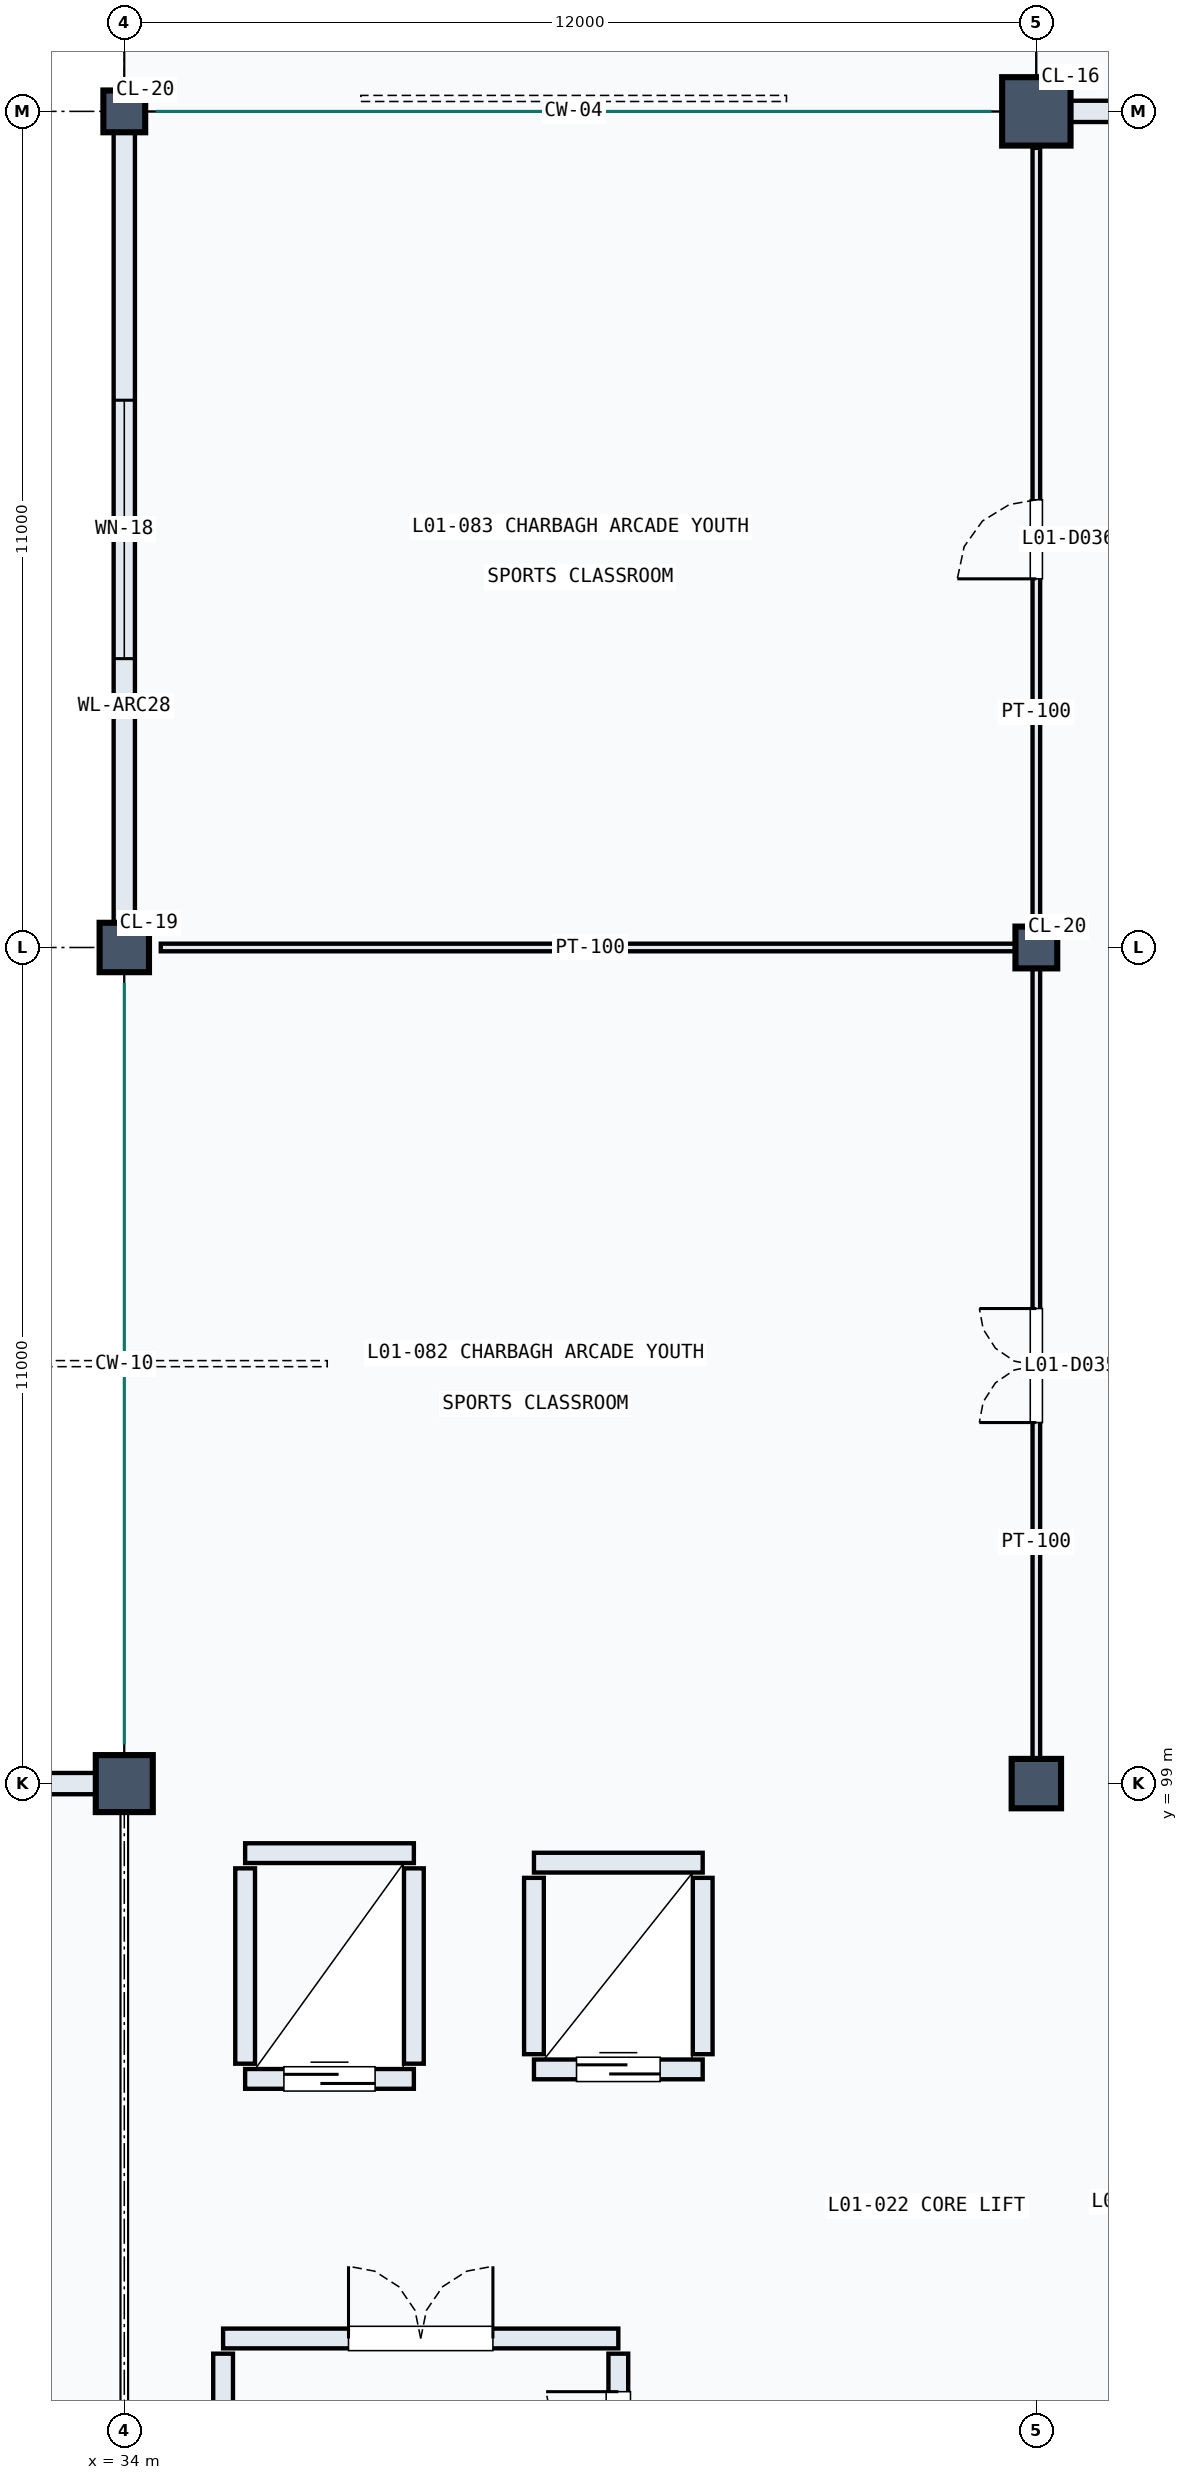
"""IFC4 building model, lengths in metres.
Left out: names, types, materials, properties, quantities, classifications, styles, units other than length and angle.
Written with IfcOpenShell. Run it as: python <this file> out.ifc"""

import sys

from ifc_helpers import new_model, si_unit, direction, frame, frame_2d, origin, origin_2d, place, context, subcontext, project, spatial, rectangle, circle, extrude, element, fill, save


model = new_model("IFC4")
c1 = context("Model", 3, precision=1e-05, world=origin(), true_north=direction((0.0, 1.0)))
c2 = subcontext(c1, "Body", "Model", "MODEL_VIEW")
j1 = project(units=[si_unit("LENGTHUNIT", "METRE"), si_unit("PLANEANGLEUNIT", "RADIAN")], contexts=[c1])
p1 = place(None, origin())
s1 = spatial("IfcSite", under=j1, at=p1, CompositionType="ELEMENT")
p2 = place(p1, origin())
s2 = spatial("IfcBuilding", under=s1, at=p2, CompositionType="ELEMENT")
p3 = place(p2, frame((0.0, 0.0, 5.4)))
s3 = spatial("IfcBuildingStorey", under=s2, at=p3, CompositionType="ELEMENT", Elevation=5.4)
p4 = place(p3, frame((34.0, 99.0, 0.0), z_axis=(0.0, 0.0, 1.0), x_axis=(1.0, 0.0, 0.0)))
e1 = element("IfcColumn", 1, at=p4, inside=s3, PredefinedType="COLUMN", context=c2, shape_type="SweptSolid", body=[
    extrude(circle(Radius=0.375, at=origin_2d()), origin(), (0.0, 0.0, 1.0), 4.8),
])
p5 = place(p3, frame((34.0, 110.0, 0.0), z_axis=(0.0, 0.0, 1.0), x_axis=(1.0, 0.0, 0.0)))
e2 = element("IfcColumn", 2, at=p5, inside=s3, PredefinedType="COLUMN", context=c2, shape_type="SweptSolid", body=[
    extrude(circle(Radius=0.325, at=origin_2d()), origin(), (0.0, 0.0, 1.0), 4.8),
])
p6 = place(p3, frame((34.0, 121.0, 0.0), z_axis=(0.0, 0.0, 1.0), x_axis=(1.0, 0.0, 0.0)))
e3 = element("IfcColumn", 3, at=p6, inside=s3, PredefinedType="COLUMN", context=c2, shape_type="SweptSolid", body=[
    extrude(circle(Radius=0.275, at=origin_2d()), origin(), (0.0, 0.0, 1.0), 4.8),
])
p7 = place(p3, frame((46.0, 99.0, 0.0), z_axis=(0.0, 0.0, 1.0), x_axis=(1.0, 0.0, 0.0)))
e4 = element("IfcColumn", 4, at=p7, inside=s3, PredefinedType="COLUMN", context=c2, shape_type="SweptSolid", body=[
    extrude(circle(Radius=0.325, at=origin_2d()), origin(), (0.0, 0.0, 1.0), 4.8),
])
p8 = place(p3, frame((46.0, 110.0, 0.0), z_axis=(0.0, 0.0, 1.0), x_axis=(1.0, 0.0, 0.0)))
e5 = element("IfcColumn", 5, at=p8, inside=s3, PredefinedType="COLUMN", context=c2, shape_type="SweptSolid", body=[
    extrude(circle(Radius=0.275, at=origin_2d()), origin(), (0.0, 0.0, 1.0), 4.8),
])
p9 = place(p3, frame((46.0, 121.0, 0.0), z_axis=(0.0, 0.0, 1.0), x_axis=(1.0, 0.0, 0.0)))
e6 = element("IfcColumn", 6, at=p9, inside=s3, PredefinedType="COLUMN", context=c2, shape_type="SweptSolid", body=[
    extrude(circle(Radius=0.45, at=origin_2d()), origin(), (0.0, 0.0, 1.0), 4.8),
])
p10 = place(p3, frame((22.22, 99.0, 0.0), z_axis=(0.0, 0.0, 1.0), x_axis=(1.0, 0.0, 0.0)))
e7 = element("IfcWall", 7, at=p10, inside=s3, PredefinedType="SOLIDWALL", context=c2, shape_type="SweptSolid", body=[
    extrude(rectangle(XDim=11.56, YDim=0.28, at=frame_2d((5.78, 0.0))), origin(), (0.0, 0.0, 1.0), 3.69),
])
p11 = place(p10, frame((4.48, 0.0, 1.1)))
e8 = element("IfcOpeningElement", 8, at=p11, cuts=e7, PredefinedType="OPENING", context=c2, shape_type="SweptSolid", body=[
    extrude(rectangle(XDim=2.6, YDim=1.4, at=frame_2d((1.3, 0.7))), frame((0.0, 0.15, 0.0), z_axis=(0.0, -1.0, 0.0), x_axis=(1.0, 0.0, 0.0)), (0.0, 0.0, 1.0), 0.3),
])
p12 = place(p3, frame((34.0, 110.22, 0.0), z_axis=(0.0, 0.0, 1.0), x_axis=(0.0, 1.0, 0.0)))
e9 = element("IfcWall", 9, at=p12, inside=s3, PredefinedType="SOLIDWALL", context=c2, shape_type="SweptSolid", body=[
    extrude(rectangle(XDim=10.56, YDim=0.28, at=frame_2d((5.28, 0.0))), origin(), (0.0, 0.0, 1.0), 4.465),
])
p13 = place(p12, frame((3.58, 0.0, 0.9)))
e10 = element("IfcOpeningElement", 10, at=p13, cuts=e9, PredefinedType="OPENING", context=c2, shape_type="SweptSolid", body=[
    extrude(rectangle(XDim=3.4, YDim=1.75, at=frame_2d((1.7, 0.875))), frame((0.0, 0.15, 0.0), z_axis=(0.0, -1.0, 0.0), x_axis=(1.0, 0.0, 0.0)), (0.0, 0.0, 1.0), 0.3),
])
p14 = place(p3, frame((46.22, 121.0, 0.0), z_axis=(0.0, 0.0, 1.0), x_axis=(1.0, 0.0, 0.0)))
e11 = element("IfcWall", 11, at=p14, inside=s3, PredefinedType="SOLIDWALL", context=c2, shape_type="SweptSolid", body=[
    extrude(rectangle(XDim=11.56, YDim=0.28, at=frame_2d((5.78, 0.0))), origin(), (0.0, 0.0, 1.0), 4.465),
])
p15 = place(p14, frame((4.53, 0.0, 1.0)))
e12 = element("IfcOpeningElement", 12, at=p15, cuts=e11, PredefinedType="OPENING", context=c2, shape_type="SweptSolid", body=[
    extrude(rectangle(XDim=2.5, YDim=1.35, at=frame_2d((1.25, 0.675))), frame((0.0, 0.15, 0.0), z_axis=(0.0, -1.0, 0.0), x_axis=(1.0, 0.0, 0.0)), (0.0, 0.0, 1.0), 0.3),
])
p16 = place(p3, frame((35.59, 95.115, 0.0), z_axis=(0.0, 0.0, 1.0), x_axis=(1.0, 0.0, 0.0)))
e13 = element("IfcWall", 13, at=p16, inside=s3, PredefinedType="SOLIDWALL", context=c2, shape_type="SweptSolid", body=[
    extrude(rectangle(XDim=2.22, YDim=0.26, at=frame_2d((1.11, 0.0))), origin(), (0.0, 0.0, 1.0), 4.46),
])
p17 = place(p16, frame((0.51, 0.0, 0.0)))
e14 = element("IfcOpeningElement", 14, at=p17, cuts=e13, PredefinedType="OPENING", context=c2, shape_type="SweptSolid", body=[
    extrude(rectangle(XDim=1.2, YDim=2.2, at=frame_2d((0.6, 1.1))), frame((0.0, 0.14, 0.0), z_axis=(0.0, -1.0, 0.0), x_axis=(1.0, 0.0, 0.0)), (0.0, 0.0, 1.0), 0.28),
])
p18 = place(p3, frame((35.59, 98.085, 0.0), z_axis=(0.0, 0.0, 1.0), x_axis=(1.0, 0.0, 0.0)))
e15 = element("IfcWall", 15, at=p18, inside=s3, PredefinedType="SOLIDWALL", context=c2, shape_type="SweptSolid", body=[
    extrude(rectangle(XDim=2.22, YDim=0.26, at=frame_2d((1.11, 0.0))), origin(), (0.0, 0.0, 1.0), 4.46),
])
for number, where, z_axis, x_axis in (
    (16, (35.59, 95.315, 0.0), (0.0, 0.0, 1.0), (0.0, 1.0, 0.0)),
    (17, (37.81, 95.315, 0.0), (0.0, 0.0, 1.0), (0.0, 1.0, 0.0)),
):
    element("IfcWall", number, at=place(p3, frame(where, z_axis=z_axis, x_axis=x_axis)), inside=s3, PredefinedType="SOLIDWALL", context=c2, shape_type="SweptSolid", body=[
        extrude(rectangle(XDim=2.57, YDim=0.26, at=frame_2d((1.285, 0.0))), origin(), (0.0, 0.0, 1.0), 4.46),
    ])
p19 = place(p3, frame((39.39, 95.24, 0.0), z_axis=(0.0, 0.0, 1.0), x_axis=(1.0, 0.0, 0.0)))
e18 = element("IfcWall", 18, at=p19, inside=s3, PredefinedType="SOLIDWALL", context=c2, shape_type="SweptSolid", body=[
    extrude(rectangle(XDim=2.22, YDim=0.26, at=frame_2d((1.11, 0.0))), origin(), (0.0, 0.0, 1.0), 4.46),
])
p20 = place(p19, frame((0.56, 0.0, 0.0)))
e19 = element("IfcOpeningElement", 19, at=p20, cuts=e18, PredefinedType="OPENING", context=c2, shape_type="SweptSolid", body=[
    extrude(rectangle(XDim=1.1, YDim=2.15, at=frame_2d((0.55, 1.075))), frame((0.0, 0.14, 0.0), z_axis=(0.0, -1.0, 0.0), x_axis=(1.0, 0.0, 0.0)), (0.0, 0.0, 1.0), 0.28),
])
p21 = place(p3, frame((39.39, 97.96, 0.0), z_axis=(0.0, 0.0, 1.0), x_axis=(1.0, 0.0, 0.0)))
e20 = element("IfcWall", 20, at=p21, inside=s3, PredefinedType="SOLIDWALL", context=c2, shape_type="SweptSolid", body=[
    extrude(rectangle(XDim=2.22, YDim=0.26, at=frame_2d((1.11, 0.0))), origin(), (0.0, 0.0, 1.0), 4.46),
])
for number, where, z_axis, x_axis in (
    (21, (39.39, 95.44, 0.0), (0.0, 0.0, 1.0), (0.0, 1.0, 0.0)),
    (22, (41.61, 95.44, 0.0), (0.0, 0.0, 1.0), (0.0, 1.0, 0.0)),
):
    element("IfcWall", number, at=place(p3, frame(where, z_axis=z_axis, x_axis=x_axis)), inside=s3, PredefinedType="SOLIDWALL", context=c2, shape_type="SweptSolid", body=[
        extrude(rectangle(XDim=2.32, YDim=0.26, at=frame_2d((1.16, 0.0))), origin(), (0.0, 0.0, 1.0), 4.46),
    ])
p22 = place(p3, frame((35.3, 91.7, 0.0), z_axis=(0.0, 0.0, 1.0), x_axis=(1.0, 0.0, 0.0)))
e23 = element("IfcWall", 23, at=p22, inside=s3, PredefinedType="SOLIDWALL", context=c2, shape_type="SweptSolid", body=[
    extrude(rectangle(XDim=5.2, YDim=0.26, at=frame_2d((2.6, 0.0))), origin(), (0.0, 0.0, 1.0), 4.46),
])
p23 = place(p22, frame((1.65, 0.0, 0.0)))
e24 = element("IfcOpeningElement", 24, at=p23, cuts=e23, PredefinedType="OPENING", context=c2, shape_type="SweptSolid", body=[
    extrude(rectangle(XDim=1.9, YDim=2.2, at=frame_2d((0.95, 1.1))), frame((0.0, 0.14, 0.0), z_axis=(0.0, -1.0, 0.0), x_axis=(1.0, 0.0, 0.0)), (0.0, 0.0, 1.0), 0.28),
])
p24 = place(p3, frame((35.3, 88.6, 0.0), z_axis=(0.0, 0.0, 1.0), x_axis=(0.0, 1.0, 0.0)))
e25 = element("IfcWall", 25, at=p24, inside=s3, PredefinedType="SOLIDWALL", context=c2, shape_type="SweptSolid", body=[
    extrude(rectangle(XDim=2.9, YDim=0.26, at=frame_2d((1.45, 0.0))), origin(), (0.0, 0.0, 1.0), 4.46),
])
p25 = place(p3, frame((40.5, 88.6, 0.0), z_axis=(0.0, 0.0, 1.0), x_axis=(0.0, 1.0, 0.0)))
e26 = element("IfcWall", 26, at=p25, inside=s3, PredefinedType="SOLIDWALL", context=c2, shape_type="SweptSolid", body=[
    extrude(rectangle(XDim=2.9, YDim=0.26, at=frame_2d((1.45, 0.0))), origin(), (0.0, 0.0, 1.0), 4.46),
])
p26 = place(p25, frame((0.5, 0.0, 0.0)))
e27 = element("IfcOpeningElement", 27, at=p26, cuts=e26, PredefinedType="OPENING", context=c2, shape_type="SweptSolid", body=[
    extrude(rectangle(XDim=1.9, YDim=2.2, at=frame_2d((0.95, 1.1))), frame((0.0, 0.14, 0.0), z_axis=(0.0, -1.0, 0.0), x_axis=(1.0, 0.0, 0.0)), (0.0, 0.0, 1.0), 0.28),
])
p27 = place(p3, frame((46.0, 99.22, 0.0), z_axis=(0.0, 0.0, 1.0), x_axis=(0.0, 1.0, 0.0)))
e28 = element("IfcWall", 28, at=p27, inside=s3, PredefinedType="PARTITIONING", context=c2, shape_type="SweptSolid", body=[
    extrude(rectangle(XDim=10.56, YDim=0.1, at=frame_2d((5.28, 0.0))), origin(), (0.0, 0.0, 1.0), 3.79),
])
p28 = place(p27, frame((4.53, 0.0, 0.0)))
e29 = element("IfcOpeningElement", 29, at=p28, cuts=e28, PredefinedType="OPENING", context=c2, shape_type="SweptSolid", body=[
    extrude(rectangle(XDim=1.5, YDim=2.3, at=frame_2d((0.75, 1.15))), frame((0.0, 0.06, 0.0), z_axis=(0.0, -1.0, 0.0), x_axis=(1.0, 0.0, 0.0)), (0.0, 0.0, 1.0), 0.12),
])
p29 = place(p3, frame((46.0, 110.22, 0.0), z_axis=(0.0, 0.0, 1.0), x_axis=(0.0, 1.0, 0.0)))
e30 = element("IfcWall", 30, at=p29, inside=s3, PredefinedType="PARTITIONING", context=c2, shape_type="SweptSolid", body=[
    extrude(rectangle(XDim=10.3, YDim=0.1, at=frame_2d((5.15, 0.0))), origin(), (0.0, 0.0, 1.0), 4.46),
])
p30 = place(p29, frame((4.63, 0.0, 0.0)))
e31 = element("IfcOpeningElement", 31, at=p30, cuts=e30, PredefinedType="OPENING", context=c2, shape_type="SweptSolid", body=[
    extrude(rectangle(XDim=1.04, YDim=2.15, at=frame_2d((0.52, 1.075))), frame((0.0, 0.06, 0.0), z_axis=(0.0, -1.0, 0.0), x_axis=(1.0, 0.0, 0.0)), (0.0, 0.0, 1.0), 0.12),
])
p31 = place(p3, frame((34.48, 110.0, 0.0), z_axis=(0.0, 0.0, 1.0), x_axis=(1.0, 0.0, 0.0)))
e32 = element("IfcWall", 32, at=p31, inside=s3, PredefinedType="PARTITIONING", context=c2, shape_type="SweptSolid", body=[
    extrude(rectangle(XDim=11.3, YDim=0.1, at=frame_2d((5.65, 0.0))), origin(), (0.0, 0.0, 1.0), 4.46),
])
p32 = place(p13, origin())
e33 = element("IfcWindow", 33, at=p32, inside=s3, PartitioningType="SINGLE_PANEL", PredefinedType="WINDOW", context=c2, shape_type="SweptSolid", body=[
    extrude(rectangle(XDim=3.4, YDim=1.75, at=frame_2d((1.7, 0.875))), frame((0.0, 0.03, 0.0), z_axis=(0.0, -1.0, 0.0), x_axis=(1.0, 0.0, 0.0)), (0.0, 0.0, 1.0), 0.06),
])
fill(e10, e33)
p33 = place(p17, origin())
e34 = element("IfcDoor", 34, at=p33, inside=s3, OperationType="SLIDING_TO_LEFT", PredefinedType="DOOR", context=c2, shape_type="SweptSolid", body=[
    extrude(rectangle(XDim=1.2, YDim=2.2, at=frame_2d((0.6, 1.1))), frame((0.0, 0.025, 0.0), z_axis=(0.0, -1.0, 0.0), x_axis=(1.0, 0.0, 0.0)), (0.0, 0.0, 1.0), 0.05),
])
fill(e14, e34)
p34 = place(p20, origin())
e35 = element("IfcDoor", 35, at=p34, inside=s3, OperationType="SLIDING_TO_LEFT", PredefinedType="DOOR", context=c2, shape_type="SweptSolid", body=[
    extrude(rectangle(XDim=1.1, YDim=2.15, at=frame_2d((0.55, 1.075))), frame((0.0, 0.025, 0.0), z_axis=(0.0, -1.0, 0.0), x_axis=(1.0, 0.0, 0.0)), (0.0, 0.0, 1.0), 0.05),
])
fill(e19, e35)
p35 = place(p23, origin())
e36 = element("IfcDoor", 36, at=p35, inside=s3, OperationType="DOUBLE_DOOR_SINGLE_SWING", PredefinedType="DOOR", context=c2, shape_type="SweptSolid", body=[
    extrude(rectangle(XDim=1.9, YDim=2.2, at=frame_2d((0.95, 1.1))), frame((0.0, 0.025, 0.0), z_axis=(0.0, -1.0, 0.0), x_axis=(1.0, 0.0, 0.0)), (0.0, 0.0, 1.0), 0.05),
])
fill(e24, e36)
p36 = place(p26, origin())
e37 = element("IfcDoor", 37, at=p36, inside=s3, OperationType="DOUBLE_DOOR_SINGLE_SWING", PredefinedType="DOOR", context=c2, shape_type="SweptSolid", body=[
    extrude(rectangle(XDim=1.9, YDim=2.2, at=frame_2d((0.95, 1.1))), frame((0.0, 0.025, 0.0), z_axis=(0.0, -1.0, 0.0), x_axis=(1.0, 0.0, 0.0)), (0.0, 0.0, 1.0), 0.05),
])
fill(e27, e37)
p37 = place(p28, origin())
e38 = element("IfcDoor", 38, at=p37, inside=s3, OperationType="DOUBLE_DOOR_SINGLE_SWING", PredefinedType="DOOR", context=c2, shape_type="SweptSolid", body=[
    extrude(rectangle(XDim=1.5, YDim=2.3, at=frame_2d((0.75, 1.15))), frame((0.0, 0.025, 0.0), z_axis=(0.0, -1.0, 0.0), x_axis=(1.0, 0.0, 0.0)), (0.0, 0.0, 1.0), 0.05),
])
fill(e29, e38)
p38 = place(p30, origin())
e39 = element("IfcDoor", 39, at=p38, inside=s3, OperationType="SINGLE_SWING_LEFT", PredefinedType="DOOR", context=c2, shape_type="SweptSolid", body=[
    extrude(rectangle(XDim=1.04, YDim=2.15, at=frame_2d((0.52, 1.075))), frame((0.0, 0.025, 0.0), z_axis=(0.0, -1.0, 0.0), x_axis=(1.0, 0.0, 0.0)), (0.0, 0.0, 1.0), 0.05),
])
fill(e31, e39)
save(model, sys.argv[1])
